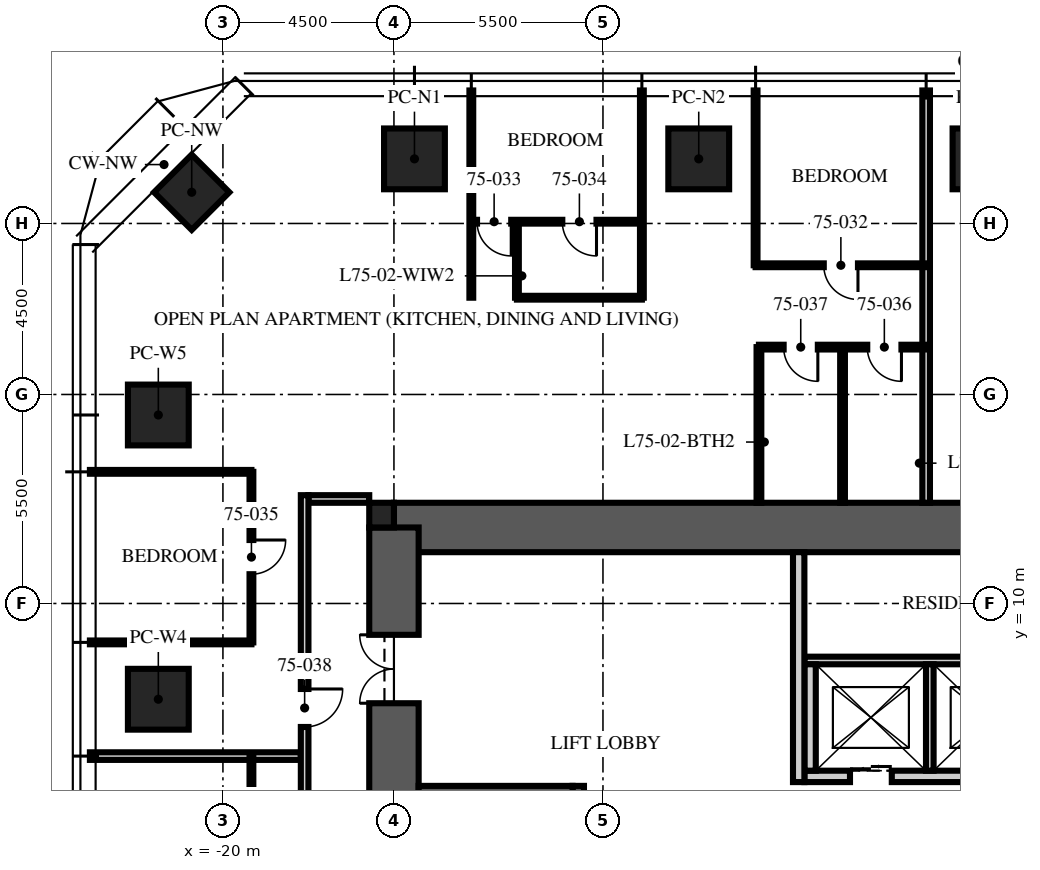
"""IFC4 building model, lengths in metres.
Left out: names, types, materials, properties, quantities, classifications, styles, units other than length and angle.
Written with IfcOpenShell. Run it as: python <this file> out.ifc"""

import sys

from ifc_helpers import new_model, si_unit, direction, frame, frame_2d, origin, origin_2d, place, context, subcontext, project, spatial, rectangle, extrude, element, fill, save


model = new_model("IFC4")
c1 = context("Model", 3, precision=1e-05, world=origin(), true_north=direction((0.0, 1.0)))
c2 = subcontext(c1, "Body", "Model", "MODEL_VIEW")
j1 = project(units=[si_unit("LENGTHUNIT", "METRE"), si_unit("PLANEANGLEUNIT", "RADIAN")], contexts=[c1])
p1 = place(None, origin())
s1 = spatial("IfcSite", under=j1, at=p1, CompositionType="ELEMENT")
p2 = place(p1, origin())
s2 = spatial("IfcBuilding", under=s1, at=p2, CompositionType="ELEMENT")
p3 = place(p2, frame((0.0, 0.0, 300.75)))
s3 = spatial("IfcBuildingStorey", under=s2, at=p3, CompositionType="ELEMENT", Elevation=300.75)
p4 = place(p3, frame((-15.5, 12.0, -0.25), z_axis=(0.0, 0.0, 1.0), x_axis=(1.0, 0.0, 0.0)))
e1 = element("IfcWall", 1, at=p4, inside=s3, PredefinedType="SHEAR", context=c2, shape_type="SweptSolid", body=[
    extrude(rectangle(XDim=31.0, YDim=1.3, at=frame_2d((15.5, 0.0))), origin(), (0.0, 0.0, 1.0), 3.75),
])
p5 = place(p3, frame((-15.5, -12.0, -0.25), z_axis=(0.0, 0.0, 1.0), x_axis=(0.0, 1.0, 0.0)))
e2 = element("IfcWall", 2, at=p5, inside=s3, PredefinedType="SHEAR", context=c2, shape_type="SweptSolid", body=[
    extrude(rectangle(XDim=24.0, YDim=1.3, at=frame_2d((12.0, 0.0))), origin(), (0.0, 0.0, 1.0), 3.75),
])
p6 = place(p5, frame((3.125, 0.0, 0.25)))
e3 = element("IfcOpeningElement", 3, at=p6, cuts=e2, PredefinedType="OPENING", context=c2, shape_type="SweptSolid", body=[
    extrude(rectangle(XDim=1.2, YDim=2.1, at=frame_2d((0.6, 1.05))), frame((0.0, 0.66, 0.0), z_axis=(0.0, -1.0, 0.0), x_axis=(1.0, 0.0, 0.0)), (0.0, 0.0, 1.0), 1.32),
])
p7 = place(p5, frame((19.375, 0.0, 0.25)))
e4 = element("IfcOpeningElement", 4, at=p7, cuts=e2, PredefinedType="OPENING", context=c2, shape_type="SweptSolid", body=[
    extrude(rectangle(XDim=1.8, YDim=2.1, at=frame_2d((0.9, 1.05))), frame((0.0, 0.66, 0.0), z_axis=(0.0, -1.0, 0.0), x_axis=(1.0, 0.0, 0.0)), (0.0, 0.0, 1.0), 1.32),
])
p8 = place(p3, frame((-15.825, 12.325, -0.25), z_axis=(0.0, 0.0, 1.0), x_axis=(1.0, 0.0, 0.0)))
e5 = element("IfcColumn", 5, at=p8, inside=s3, PredefinedType="COLUMN", context=c2, shape_type="SweptSolid", body=[
    extrude(rectangle(XDim=0.65, YDim=0.65, at=origin_2d()), origin(), (0.0, 0.0, 1.0), 3.75),
])
for number, where, z_axis, x_axis in (
    (6, (-14.96, 21.7, 0.0), (0.0, 0.0, 1.0), (1.0, 0.0, 0.0)),
    (7, (-7.48, 21.7, 0.0), (0.0, 0.0, 1.0), (1.0, 0.0, 0.0)),
    (8, (0.0, 21.7, 0.0), (0.0, 0.0, 1.0), (1.0, 0.0, 0.0)),
    (9, (-21.7, 7.48, 0.0), (0.0, 0.0, 1.0), (0.0, 1.0, 0.0)),
    (10, (-21.7, 14.96, 0.0), (0.0, 0.0, 1.0), (0.0, 1.0, 0.0)),
):
    element("IfcColumn", number, at=place(p3, frame(where, z_axis=z_axis, x_axis=x_axis)), inside=s3, PredefinedType="COLUMN", context=c2, shape_type="SweptSolid", body=[
        extrude(rectangle(XDim=1.6, YDim=1.6, at=origin_2d()), origin(), (0.0, 0.0, 1.0), 3.75),
    ])
p9 = place(p3, frame((-20.821, 20.821, 0.0), z_axis=(0.0, 0.0, 1.0), x_axis=(0.707106781187, 0.707106781187, 0.0)))
e11 = element("IfcColumn", 11, at=p9, inside=s3, PredefinedType="COLUMN", context=c2, shape_type="SweptSolid", body=[
    extrude(rectangle(XDim=1.4, YDim=1.4, at=origin_2d()), origin(), (0.0, 0.0, 1.0), 3.75),
])
p10 = place(p3, frame((-10.65, -4.9, 0.0), z_axis=(0.0, 0.0, 1.0), x_axis=(0.0, 1.0, 0.0)))
e12 = element("IfcWall", 12, at=p10, inside=s3, PredefinedType="SOLIDWALL", context=c2, shape_type="SweptSolid", body=[
    extrude(rectangle(XDim=10.1, YDim=0.3, at=frame_2d((5.05, 0.0))), origin(), (0.0, 0.0, 1.0), 3.5),
])
p11 = place(p3, frame((-14.85, 5.05, 0.0), z_axis=(0.0, 0.0, 1.0), x_axis=(1.0, 0.0, 0.0)))
e13 = element("IfcWall", 13, at=p11, inside=s3, PredefinedType="SOLIDWALL", context=c2, shape_type="SweptSolid", body=[
    extrude(rectangle(XDim=4.05, YDim=0.3, at=frame_2d((2.025, 0.0))), origin(), (0.0, 0.0, 1.0), 3.5),
])
p12 = place(p3, frame((-4.7, 5.45, 0.0), z_axis=(0.0, 0.0, 1.0), x_axis=(1.0, 0.0, 0.0)))
e14 = element("IfcWall", 14, at=p12, inside=s3, PredefinedType="PARTITIONING", context=c2, shape_type="SweptSolid", body=[
    extrude(rectangle(XDim=9.7, YDim=0.3, at=frame_2d((4.85, 0.0))), origin(), (0.0, 0.0, 1.0), 3.5),
])
p13 = place(p12, frame((1.2, 0.0, 0.0)))
e15 = element("IfcOpeningElement", 15, at=p13, cuts=e14, PredefinedType="OPENING", context=c2, shape_type="SweptSolid", body=[
    extrude(rectangle(XDim=1.1, YDim=2.1, at=frame_2d((0.55, 1.05))), frame((0.0, 0.16, 0.0), z_axis=(0.0, -1.0, 0.0), x_axis=(1.0, 0.0, 0.0)), (0.0, 0.0, 1.0), 0.32),
])
p14 = place(p12, frame((4.3, 0.0, 0.0)))
e16 = element("IfcOpeningElement", 16, at=p14, cuts=e14, PredefinedType="OPENING", context=c2, shape_type="SweptSolid", body=[
    extrude(rectangle(XDim=1.1, YDim=2.1, at=frame_2d((0.55, 1.05))), frame((0.0, 0.16, 0.0), z_axis=(0.0, -1.0, 0.0), x_axis=(1.0, 0.0, 0.0)), (0.0, 0.0, 1.0), 0.32),
])
p15 = place(p12, frame((7.4, 0.0, 0.0)))
e17 = element("IfcOpeningElement", 17, at=p15, cuts=e14, PredefinedType="OPENING", context=c2, shape_type="SweptSolid", body=[
    extrude(rectangle(XDim=1.1, YDim=2.1, at=frame_2d((0.55, 1.05))), frame((0.0, 0.16, 0.0), z_axis=(0.0, -1.0, 0.0), x_axis=(1.0, 0.0, 0.0)), (0.0, 0.0, 1.0), 0.32),
])
p16 = place(p3, frame((-4.7, 8.5, 0.0), z_axis=(0.0, 0.0, 1.0), x_axis=(1.0, 0.0, 0.0)))
e18 = element("IfcWall", 18, at=p16, inside=s3, PredefinedType="PARTITIONING", context=c2, shape_type="SweptSolid", body=[
    extrude(rectangle(XDim=9.7, YDim=0.2, at=frame_2d((4.85, 0.0))), origin(), (0.0, 0.0, 1.0), 3.5),
])
p17 = place(p3, frame((-4.55, 5.6, 0.0), z_axis=(0.0, 0.0, 1.0), x_axis=(0.0, 1.0, 0.0)))
e19 = element("IfcWall", 19, at=p17, inside=s3, PredefinedType="PARTITIONING", context=c2, shape_type="SweptSolid", body=[
    extrude(rectangle(XDim=2.8, YDim=0.3, at=frame_2d((1.4, 0.0))), origin(), (0.0, 0.0, 1.0), 3.5),
])
p18 = place(p3, frame((-1.4, 5.6, 0.0), z_axis=(0.0, 0.0, 1.0), x_axis=(0.0, 1.0, 0.0)))
e20 = element("IfcWall", 20, at=p18, inside=s3, PredefinedType="PARTITIONING", context=c2, shape_type="SweptSolid", body=[
    extrude(rectangle(XDim=2.8, YDim=0.2, at=frame_2d((1.4, 0.0))), origin(), (0.0, 0.0, 1.0), 3.5),
])
p19 = place(p3, frame((-4.85, 5.3, 0.0), z_axis=(0.0, 0.0, 1.0), x_axis=(0.0, 1.0, 0.0)))
e21 = element("IfcWall", 21, at=p19, inside=s3, PredefinedType="PARTITIONING", context=c2, shape_type="SweptSolid", body=[
    extrude(rectangle(XDim=6.05, YDim=0.3, at=frame_2d((3.025, 0.0))), origin(), (0.0, 0.0, 1.0), 3.5),
])
p20 = place(p3, frame((-16.15, 12.75, 0.0), z_axis=(0.0, 0.0, 1.0), x_axis=(-1.0, 0.0, 0.0)))
e22 = element("IfcWall", 22, at=p20, inside=s3, PredefinedType="PARTITIONING", context=c2, shape_type="SweptSolid", body=[
    extrude(rectangle(XDim=1.6, YDim=0.2, at=frame_2d((0.8, 0.0))), origin(), (0.0, 0.0, 1.0), 2.6),
])
p21 = place(p3, frame((-1.496, 12.65, 0.0), z_axis=(0.0, 0.0, 1.0), x_axis=(0.0, 1.0, 0.0)))
e23 = element("IfcWall", 23, at=p21, inside=s3, PredefinedType="PARTITIONING", context=c2, shape_type="SweptSolid", body=[
    extrude(rectangle(XDim=10.85, YDim=0.2, at=frame_2d((5.425, 0.0))), origin(), (0.0, 0.0, 1.0), 3.01),
])
p22 = place(p3, frame((-5.984, 18.9, 0.0), z_axis=(0.0, 0.0, 1.0), x_axis=(0.0, 1.0, 0.0)))
e24 = element("IfcWall", 24, at=p22, inside=s3, PredefinedType="PARTITIONING", context=c2, shape_type="SweptSolid", body=[
    extrude(rectangle(XDim=4.6, YDim=0.1, at=frame_2d((2.3, 0.0))), origin(), (0.0, 0.0, 1.0), 3.01),
])
for number, where, z_axis, x_axis in (
    (25, (-8.976, 18.046, 0.0), (0.0, 0.0, 1.0), (0.0, 1.0, 0.0)),
    (26, (-13.464, 18.046, 0.0), (0.0, 0.0, 1.0), (0.0, 1.0, 0.0)),
):
    element("IfcWall", number, at=place(p3, frame(where, z_axis=z_axis, x_axis=x_axis)), inside=s3, PredefinedType="PARTITIONING", context=c2, shape_type="SweptSolid", body=[
        extrude(rectangle(XDim=5.454, YDim=0.1, at=frame_2d((2.727, 0.0))), origin(), (0.0, 0.0, 1.0), 3.01),
    ])
for number, where, z_axis, x_axis in (
    (27, (-19.25, 13.464, 0.0), (0.0, 0.0, 1.0), (-1.0, 0.0, 0.0)),
    (28, (-19.25, 8.976, 0.0), (0.0, 0.0, 1.0), (-1.0, 0.0, 0.0)),
):
    element("IfcWall", number, at=place(p3, frame(where, z_axis=z_axis, x_axis=x_axis)), inside=s3, PredefinedType="PARTITIONING", context=c2, shape_type="SweptSolid", body=[
        extrude(rectangle(XDim=4.25, YDim=0.1, at=frame_2d((2.125, 0.0))), origin(), (0.0, 0.0, 1.0), 3.01),
    ])
p23 = place(p3, frame((-17.95, 5.984, 0.0), z_axis=(0.0, 0.0, 1.0), x_axis=(-1.0, 0.0, 0.0)))
e29 = element("IfcWall", 29, at=p23, inside=s3, PredefinedType="PARTITIONING", context=c2, shape_type="SweptSolid", body=[
    extrude(rectangle(XDim=5.55, YDim=0.2, at=frame_2d((2.775, 0.0))), origin(), (0.0, 0.0, 1.0), 3.01),
])
p24 = place(p3, frame((-1.496, 18.9, 0.0), z_axis=(0.0, 0.0, 1.0), x_axis=(-1.0, 0.0, 0.0)))
e30 = element("IfcWall", 30, at=p24, inside=s3, PredefinedType="PARTITIONING", context=c2, shape_type="SweptSolid", body=[
    extrude(rectangle(XDim=4.488, YDim=0.1, at=frame_2d((2.244, 0.0))), origin(), (0.0, 0.0, 1.0), 2.91),
])
p25 = place(p24, frame((1.794, 0.0, 0.0)))
e31 = element("IfcOpeningElement", 31, at=p25, cuts=e30, PredefinedType="OPENING", context=c2, shape_type="SweptSolid", body=[
    extrude(rectangle(XDim=0.9, YDim=2.1, at=frame_2d((0.45, 1.05))), frame((0.0, 0.06, 0.0), z_axis=(0.0, -1.0, 0.0), x_axis=(1.0, 0.0, 0.0)), (0.0, 0.0, 1.0), 0.12),
])
p26 = place(p3, frame((-8.976, 20.046, 0.0), z_axis=(0.0, 0.0, 1.0), x_axis=(-1.0, 0.0, 0.0)))
e32 = element("IfcWall", 32, at=p26, inside=s3, PredefinedType="PARTITIONING", context=c2, shape_type="SweptSolid", body=[
    extrude(rectangle(XDim=4.488, YDim=0.1, at=frame_2d((2.244, 0.0))), origin(), (0.0, 0.0, 1.0), 2.91),
])
p27 = place(p26, frame((3.438, 0.0, 0.0)))
e33 = element("IfcOpeningElement", 33, at=p27, cuts=e32, PredefinedType="OPENING", context=c2, shape_type="SweptSolid", body=[
    extrude(rectangle(XDim=0.9, YDim=2.1, at=frame_2d((0.45, 1.05))), frame((0.0, 0.06, 0.0), z_axis=(0.0, -1.0, 0.0), x_axis=(1.0, 0.0, 0.0)), (0.0, 0.0, 1.0), 0.12),
])
p28 = place(p26, frame((1.194, 0.0, 0.0)))
e34 = element("IfcOpeningElement", 34, at=p28, cuts=e32, PredefinedType="OPENING", context=c2, shape_type="SweptSolid", body=[
    extrude(rectangle(XDim=0.9, YDim=2.1, at=frame_2d((0.45, 1.05))), frame((0.0, 0.06, 0.0), z_axis=(0.0, -1.0, 0.0), x_axis=(1.0, 0.0, 0.0)), (0.0, 0.0, 1.0), 0.12),
])
p29 = place(p3, frame((-12.264, 18.046, 0.0), z_axis=(0.0, 0.0, 1.0), x_axis=(0.0, 1.0, 0.0)))
e35 = element("IfcWall", 35, at=p29, inside=s3, PredefinedType="PARTITIONING", context=c2, shape_type="SweptSolid", body=[
    extrude(rectangle(XDim=2.0, YDim=0.1, at=frame_2d((1.0, 0.0))), origin(), (0.0, 0.0, 1.0), 3.5),
])
p30 = place(p3, frame((-8.976, 18.046, 0.0), z_axis=(0.0, 0.0, 1.0), x_axis=(-1.0, 0.0, 0.0)))
e36 = element("IfcWall", 36, at=p30, inside=s3, PredefinedType="PARTITIONING", context=c2, shape_type="SweptSolid", body=[
    extrude(rectangle(XDim=3.288, YDim=0.1, at=frame_2d((1.644, 0.0))), origin(), (0.0, 0.0, 1.0), 2.91),
])
p31 = place(p3, frame((-19.25, 13.464, 0.0), z_axis=(0.0, 0.0, 1.0), x_axis=(0.0, -1.0, 0.0)))
e37 = element("IfcWall", 37, at=p31, inside=s3, PredefinedType="PARTITIONING", context=c2, shape_type="SweptSolid", body=[
    extrude(rectangle(XDim=4.488, YDim=0.1, at=frame_2d((2.244, 0.0))), origin(), (0.0, 0.0, 1.0), 2.91),
])
p32 = place(p31, frame((1.794, 0.0, 0.0)))
e38 = element("IfcOpeningElement", 38, at=p32, cuts=e37, PredefinedType="OPENING", context=c2, shape_type="SweptSolid", body=[
    extrude(rectangle(XDim=0.9, YDim=2.1, at=frame_2d((0.45, 1.05))), frame((0.0, 0.06, 0.0), z_axis=(0.0, -1.0, 0.0), x_axis=(1.0, 0.0, 0.0)), (0.0, 0.0, 1.0), 0.12),
])
p33 = place(p3, frame((-1.496, 16.746, 0.0), z_axis=(0.0, 0.0, 1.0), x_axis=(-1.0, 0.0, 0.0)))
e39 = element("IfcWall", 39, at=p33, inside=s3, PredefinedType="PARTITIONING", context=c2, shape_type="SweptSolid", body=[
    extrude(rectangle(XDim=4.4, YDim=0.125, at=frame_2d((2.2, 0.0))), origin(), (0.0, 0.0, 1.0), 2.91),
])
p34 = place(p33, frame((0.65, 0.0, 0.0)))
e40 = element("IfcOpeningElement", 40, at=p34, cuts=e39, PredefinedType="OPENING", context=c2, shape_type="SweptSolid", body=[
    extrude(rectangle(XDim=0.9, YDim=2.1, at=frame_2d((0.45, 1.05))), frame((0.0, 0.073, 0.0), z_axis=(0.0, -1.0, 0.0), x_axis=(1.0, 0.0, 0.0)), (0.0, 0.0, 1.0), 0.145),
])
p35 = place(p33, frame((2.85, 0.0, 0.0)))
e41 = element("IfcOpeningElement", 41, at=p35, cuts=e39, PredefinedType="OPENING", context=c2, shape_type="SweptSolid", body=[
    extrude(rectangle(XDim=0.9, YDim=2.1, at=frame_2d((0.45, 1.05))), frame((0.0, 0.073, 0.0), z_axis=(0.0, -1.0, 0.0), x_axis=(1.0, 0.0, 0.0)), (0.0, 0.0, 1.0), 0.145),
])
p36 = place(p3, frame((-3.696, 12.65, 0.0), z_axis=(0.0, 0.0, 1.0), x_axis=(0.0, 1.0, 0.0)))
e42 = element("IfcWall", 42, at=p36, inside=s3, PredefinedType="PARTITIONING", context=c2, shape_type="SweptSolid", body=[
    extrude(rectangle(XDim=4.096, YDim=0.125, at=frame_2d((2.048, 0.0))), origin(), (0.0, 0.0, 1.0), 2.91),
])
p37 = place(p3, frame((-5.896, 12.65, 0.0), z_axis=(0.0, 0.0, 1.0), x_axis=(0.0, 1.0, 0.0)))
e43 = element("IfcWall", 43, at=p37, inside=s3, PredefinedType="PARTITIONING", context=c2, shape_type="SweptSolid", body=[
    extrude(rectangle(XDim=4.096, YDim=0.125, at=frame_2d((2.048, 0.0))), origin(), (0.0, 0.0, 1.0), 3.5),
])
p38 = place(p3, frame((-19.25, 5.984, 0.0), z_axis=(0.0, 0.0, 1.0), x_axis=(0.0, -1.0, 0.0)))
e44 = element("IfcWall", 44, at=p38, inside=s3, PredefinedType="PARTITIONING", context=c2, shape_type="SweptSolid", body=[
    extrude(rectangle(XDim=4.488, YDim=0.1, at=frame_2d((2.244, 0.0))), origin(), (0.0, 0.0, 1.0), 2.91),
])
p39 = place(p38, frame((1.794, 0.0, 0.0)))
e45 = element("IfcOpeningElement", 45, at=p39, cuts=e44, PredefinedType="OPENING", context=c2, shape_type="SweptSolid", body=[
    extrude(rectangle(XDim=0.9, YDim=2.1, at=frame_2d((0.45, 1.05))), frame((0.0, 0.06, 0.0), z_axis=(0.0, -1.0, 0.0), x_axis=(1.0, 0.0, 0.0)), (0.0, 0.0, 1.0), 0.12),
])
p40 = place(p3, frame((-17.85, 12.85, 0.0), z_axis=(0.0, 0.0, 1.0), x_axis=(0.0, -1.0, 0.0)))
e46 = element("IfcWall", 46, at=p40, inside=s3, PredefinedType="PARTITIONING", context=c2, shape_type="SweptSolid", body=[
    extrude(rectangle(XDim=25.7, YDim=0.2, at=frame_2d((12.85, 0.0))), origin(), (0.0, 0.0, 1.0), 2.9),
])
p41 = place(p40, frame((5.1, 0.0, 0.0)))
e47 = element("IfcOpeningElement", 47, at=p41, cuts=e46, PredefinedType="OPENING", context=c2, shape_type="SweptSolid", body=[
    extrude(rectangle(XDim=1.0, YDim=2.2, at=frame_2d((0.5, 1.1))), frame((0.0, 0.11, 0.0), z_axis=(0.0, -1.0, 0.0), x_axis=(1.0, 0.0, 0.0)), (0.0, 0.0, 1.0), 0.22),
])
p42 = place(p40, frame((23.386, 0.0, 0.0)))
e48 = element("IfcOpeningElement", 48, at=p42, cuts=e46, PredefinedType="OPENING", context=c2, shape_type="SweptSolid", body=[
    extrude(rectangle(XDim=1.0, YDim=2.2, at=frame_2d((0.5, 1.1))), frame((0.0, 0.11, 0.0), z_axis=(0.0, -1.0, 0.0), x_axis=(1.0, 0.0, 0.0)), (0.0, 0.0, 1.0), 0.22),
])
p43 = place(p7, origin())
e49 = element("IfcDoor", 49, at=p43, inside=s3, OperationType="DOUBLE_DOOR_SINGLE_SWING", PredefinedType="DOOR", context=c2, shape_type="SweptSolid", body=[
    extrude(rectangle(XDim=1.8, YDim=2.1, at=frame_2d((0.9, 1.05))), frame((0.0, 0.025, 0.0), z_axis=(0.0, -1.0, 0.0), x_axis=(1.0, 0.0, 0.0)), (0.0, 0.0, 1.0), 0.05),
])
fill(e4, e49)
p44 = place(p13, origin())
e50 = element("IfcDoor", 50, at=p44, inside=s3, OperationType="DOUBLE_DOOR_SLIDING", PredefinedType="DOOR", context=c2, shape_type="SweptSolid", body=[
    extrude(rectangle(XDim=1.1, YDim=2.1, at=frame_2d((0.55, 1.05))), frame((0.0, 0.025, 0.0), z_axis=(0.0, -1.0, 0.0), x_axis=(1.0, 0.0, 0.0)), (0.0, 0.0, 1.0), 0.05),
])
fill(e15, e50)
p45 = place(p25, origin())
e51 = element("IfcDoor", 51, at=p45, inside=s3, OperationType="SINGLE_SWING_LEFT", PredefinedType="DOOR", context=c2, shape_type="SweptSolid", body=[
    extrude(rectangle(XDim=0.9, YDim=2.1, at=frame_2d((0.45, 1.05))), frame((0.0, 0.025, 0.0), z_axis=(0.0, -1.0, 0.0), x_axis=(1.0, 0.0, 0.0)), (0.0, 0.0, 1.0), 0.05),
])
fill(e31, e51)
p46 = place(p27, origin())
e52 = element("IfcDoor", 52, at=p46, inside=s3, OperationType="SINGLE_SWING_LEFT", PredefinedType="DOOR", context=c2, shape_type="SweptSolid", body=[
    extrude(rectangle(XDim=0.9, YDim=2.1, at=frame_2d((0.45, 1.05))), frame((0.0, 0.025, 0.0), z_axis=(0.0, -1.0, 0.0), x_axis=(1.0, 0.0, 0.0)), (0.0, 0.0, 1.0), 0.05),
])
fill(e33, e52)
p47 = place(p28, origin())
e53 = element("IfcDoor", 53, at=p47, inside=s3, OperationType="SINGLE_SWING_LEFT", PredefinedType="DOOR", context=c2, shape_type="SweptSolid", body=[
    extrude(rectangle(XDim=0.9, YDim=2.1, at=frame_2d((0.45, 1.05))), frame((0.0, 0.025, 0.0), z_axis=(0.0, -1.0, 0.0), x_axis=(1.0, 0.0, 0.0)), (0.0, 0.0, 1.0), 0.05),
])
fill(e34, e53)
p48 = place(p32, origin())
e54 = element("IfcDoor", 54, at=p48, inside=s3, OperationType="SINGLE_SWING_LEFT", PredefinedType="DOOR", context=c2, shape_type="SweptSolid", body=[
    extrude(rectangle(XDim=0.9, YDim=2.1, at=frame_2d((0.45, 1.05))), frame((0.0, 0.025, 0.0), z_axis=(0.0, -1.0, 0.0), x_axis=(1.0, 0.0, 0.0)), (0.0, 0.0, 1.0), 0.05),
])
fill(e38, e54)
p49 = place(p34, origin())
e55 = element("IfcDoor", 55, at=p49, inside=s3, OperationType="SINGLE_SWING_LEFT", PredefinedType="DOOR", context=c2, shape_type="SweptSolid", body=[
    extrude(rectangle(XDim=0.9, YDim=2.1, at=frame_2d((0.45, 1.05))), frame((0.0, 0.025, 0.0), z_axis=(0.0, -1.0, 0.0), x_axis=(1.0, 0.0, 0.0)), (0.0, 0.0, 1.0), 0.05),
])
fill(e40, e55)
p50 = place(p35, origin())
e56 = element("IfcDoor", 56, at=p50, inside=s3, OperationType="SINGLE_SWING_LEFT", PredefinedType="DOOR", context=c2, shape_type="SweptSolid", body=[
    extrude(rectangle(XDim=0.9, YDim=2.1, at=frame_2d((0.45, 1.05))), frame((0.0, 0.025, 0.0), z_axis=(0.0, -1.0, 0.0), x_axis=(1.0, 0.0, 0.0)), (0.0, 0.0, 1.0), 0.05),
])
fill(e41, e56)
p51 = place(p41, origin())
e57 = element("IfcDoor", 57, at=p51, inside=s3, OperationType="SINGLE_SWING_LEFT", PredefinedType="DOOR", context=c2, shape_type="SweptSolid", body=[
    extrude(rectangle(XDim=1.0, YDim=2.2, at=frame_2d((0.5, 1.1))), frame((0.0, 0.025, 0.0), z_axis=(0.0, -1.0, 0.0), x_axis=(1.0, 0.0, 0.0)), (0.0, 0.0, 1.0), 0.05),
])
fill(e47, e57)
save(model, sys.argv[1])
